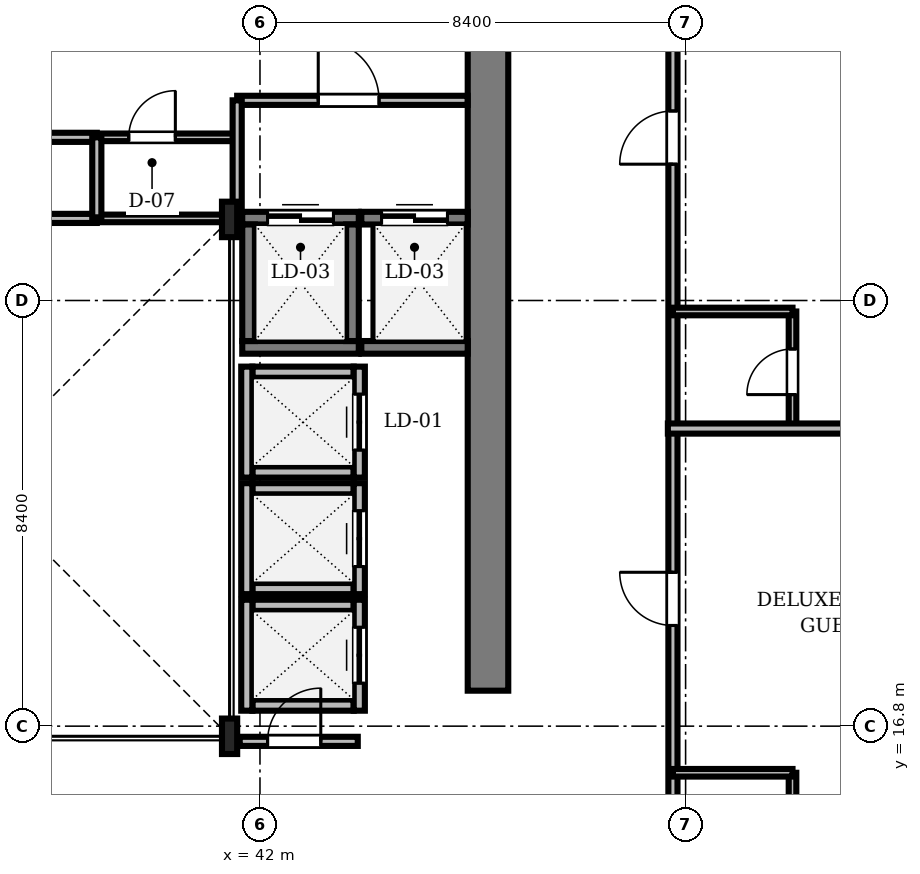
"""IFC4 building model, lengths in metres.
Left out: names, types, materials, properties, quantities, classifications, styles, units other than length and angle.
Written with IfcOpenShell. Run it as: python <this file> out.ifc"""

import sys

from ifc_helpers import new_model, si_unit, direction, frame, frame_2d, origin, origin_2d, place, context, subcontext, project, spatial, rectangle, i_section, extrude, source, transform, mapped, element, fill, save


model = new_model("IFC4")
c1 = context("Model", 3, precision=1e-05, world=origin(), true_north=direction((0.0, 1.0)))
c2 = subcontext(c1, "Body", "Model", "MODEL_VIEW")
j1 = project(units=[si_unit("LENGTHUNIT", "METRE"), si_unit("PLANEANGLEUNIT", "RADIAN")], contexts=[c1])
p1 = place(None, origin())
s1 = spatial("IfcSite", under=j1, at=p1, CompositionType="ELEMENT")
p2 = place(p1, origin())
s2 = spatial("IfcBuilding", under=s1, at=p2, CompositionType="ELEMENT")
p3 = place(p2, frame((0.0, 0.0, 233.55)))
s3 = spatial("IfcBuildingStorey", under=s2, at=p3, CompositionType="ELEMENT", Elevation=233.55)
m1 = source(origin(), c2, "Body", "SweptSolid", [
    extrude(rectangle(XDim=13.15, YDim=0.8, at=frame_2d((6.575, 0.0))), origin(), (0.0, 0.0, 1.0), 3.1),
])
p4 = place(p3, frame((46.5, 17.5, 0.0), z_axis=(0.0, 0.0, 1.0), x_axis=(0.0, 1.0, 0.0)))
e1 = element("IfcWall", 1, at=p4, inside=s3, PredefinedType="SHEAR", context=c2, shape_type="MappedRepresentation", body=[
    mapped(m1, transform((0.0, 0.0, 0.0), scale=1.0)),
])
m2 = source(origin(), c2, "Body", "SweptSolid", [
    extrude(i_section(OverallWidth=0.3, OverallDepth=0.7, WebThickness=0.017, FlangeThickness=0.032, FilletRadius=0.027, at=origin_2d()), origin(), (0.0, 0.0, 1.0), 3.1),
])
for number, where, z_axis, x_axis in (
    (2, (41.4, 16.6, 0.0), (0.0, 0.0, 1.0), (1.0, 0.0, 0.0)),
    (3, (41.4, 26.8, 0.0), (0.0, 0.0, 1.0), (1.0, 0.0, 0.0)),
):
    element("IfcColumn", number, at=place(p3, frame(where, z_axis=z_axis, x_axis=x_axis)), inside=s3, PredefinedType="COLUMN", context=c2, shape_type="MappedRepresentation", body=[
        mapped(m2, transform((0.0, 0.0, 0.0), scale=1.0)),
    ])
m3 = source(origin(), c2, "Body", "SweptSolid", [
    extrude(rectangle(XDim=2.0, YDim=0.22, at=frame_2d((1.0, 0.0))), origin(), (0.0, 0.0, 1.0), 3.1),
])
for number, where, z_axis, x_axis in (
    (4, (41.85, 21.815, 0.0), (0.0, 0.0, 1.0), (1.0, 0.0, 0.0)),
    (5, (41.85, 23.785, 0.0), (0.0, 0.0, 1.0), (1.0, 0.0, 0.0)),
):
    element("IfcWall", number, at=place(p3, frame(where, z_axis=z_axis, x_axis=x_axis)), inside=s3, PredefinedType="SOLIDWALL", context=c2, shape_type="MappedRepresentation", body=[
        mapped(m3, transform((0.0, 0.0, 0.0), scale=1.0)),
    ])
m4 = source(origin(), c2, "Body", "SweptSolid", [
    extrude(rectangle(XDim=2.19, YDim=0.22, at=frame_2d((1.095, 0.0))), origin(), (0.0, 0.0, 1.0), 3.1),
])
p5 = place(p3, frame((41.74, 21.705, 0.0), z_axis=(0.0, 0.0, 1.0), x_axis=(0.0, 1.0, 0.0)))
e6 = element("IfcWall", 6, at=p5, inside=s3, PredefinedType="SOLIDWALL", context=c2, shape_type="MappedRepresentation", body=[
    mapped(m4, transform((0.0, 0.0, 0.0), scale=1.0)),
])
p6 = place(p3, frame((43.96, 21.705, 0.0), z_axis=(0.0, 0.0, 1.0), x_axis=(0.0, 1.0, 0.0)))
e7 = element("IfcWall", 7, at=p6, inside=s3, PredefinedType="SOLIDWALL", context=c2, shape_type="MappedRepresentation", body=[
    mapped(m4, transform((0.0, 0.0, 0.0), scale=1.0)),
])
m5 = source(origin(), c2, "Body", "SweptSolid", [
    extrude(rectangle(XDim=1.1, YDim=2.2, at=frame_2d((0.55, 1.1))), frame((0.0, 0.12, 0.0), z_axis=(0.0, -1.0, 0.0), x_axis=(1.0, 0.0, 0.0)), (0.0, 0.0, 1.0), 0.24),
])
p7 = place(p6, frame((0.545, 0.0, 0.0)))
e8 = element("IfcOpeningElement", 8, at=p7, cuts=e7, PredefinedType="OPENING", context=c2, shape_type="MappedRepresentation", body=[
    mapped(m5, transform((0.0, 0.0, 0.0), scale=1.0)),
])
for number, where, z_axis, x_axis in (
    (9, (41.85, 19.515, 0.0), (0.0, 0.0, 1.0), (1.0, 0.0, 0.0)),
    (10, (41.85, 21.485, 0.0), (0.0, 0.0, 1.0), (1.0, 0.0, 0.0)),
):
    element("IfcWall", number, at=place(p3, frame(where, z_axis=z_axis, x_axis=x_axis)), inside=s3, PredefinedType="SOLIDWALL", context=c2, shape_type="MappedRepresentation", body=[
        mapped(m3, transform((0.0, 0.0, 0.0), scale=1.0)),
    ])
p8 = place(p3, frame((41.74, 19.405, 0.0), z_axis=(0.0, 0.0, 1.0), x_axis=(0.0, 1.0, 0.0)))
e11 = element("IfcWall", 11, at=p8, inside=s3, PredefinedType="SOLIDWALL", context=c2, shape_type="MappedRepresentation", body=[
    mapped(m4, transform((0.0, 0.0, 0.0), scale=1.0)),
])
p9 = place(p3, frame((43.96, 19.405, 0.0), z_axis=(0.0, 0.0, 1.0), x_axis=(0.0, 1.0, 0.0)))
e12 = element("IfcWall", 12, at=p9, inside=s3, PredefinedType="SOLIDWALL", context=c2, shape_type="MappedRepresentation", body=[
    mapped(m4, transform((0.0, 0.0, 0.0), scale=1.0)),
])
p10 = place(p9, frame((0.545, 0.0, 0.0)))
e13 = element("IfcOpeningElement", 13, at=p10, cuts=e12, PredefinedType="OPENING", context=c2, shape_type="MappedRepresentation", body=[
    mapped(m5, transform((0.0, 0.0, 0.0), scale=1.0)),
])
for number, where, z_axis, x_axis in (
    (14, (41.85, 17.215, 0.0), (0.0, 0.0, 1.0), (1.0, 0.0, 0.0)),
    (15, (41.85, 19.185, 0.0), (0.0, 0.0, 1.0), (1.0, 0.0, 0.0)),
):
    element("IfcWall", number, at=place(p3, frame(where, z_axis=z_axis, x_axis=x_axis)), inside=s3, PredefinedType="SOLIDWALL", context=c2, shape_type="MappedRepresentation", body=[
        mapped(m3, transform((0.0, 0.0, 0.0), scale=1.0)),
    ])
p11 = place(p3, frame((41.74, 17.105, 0.0), z_axis=(0.0, 0.0, 1.0), x_axis=(0.0, 1.0, 0.0)))
e16 = element("IfcWall", 16, at=p11, inside=s3, PredefinedType="SOLIDWALL", context=c2, shape_type="MappedRepresentation", body=[
    mapped(m4, transform((0.0, 0.0, 0.0), scale=1.0)),
])
p12 = place(p3, frame((43.96, 17.105, 0.0), z_axis=(0.0, 0.0, 1.0), x_axis=(0.0, 1.0, 0.0)))
e17 = element("IfcWall", 17, at=p12, inside=s3, PredefinedType="SOLIDWALL", context=c2, shape_type="MappedRepresentation", body=[
    mapped(m4, transform((0.0, 0.0, 0.0), scale=1.0)),
])
p13 = place(p12, frame((0.545, 0.0, 0.0)))
e18 = element("IfcOpeningElement", 18, at=p13, cuts=e17, PredefinedType="OPENING", context=c2, shape_type="MappedRepresentation", body=[
    mapped(m5, transform((0.0, 0.0, 0.0), scale=1.0)),
])
m6 = source(origin(), c2, "Body", "SweptSolid", [
    extrude(rectangle(XDim=2.3, YDim=0.25, at=frame_2d((1.15, 0.0))), origin(), (0.0, 0.0, 1.0), 3.1),
])
p14 = place(p3, frame((41.65, 24.275, 0.0), z_axis=(0.0, 0.0, 1.0), x_axis=(1.0, 0.0, 0.0)))
e19 = element("IfcWall", 19, at=p14, inside=s3, PredefinedType="SOLIDWALL", context=c2, shape_type="MappedRepresentation", body=[
    mapped(m6, transform((0.0, 0.0, 0.0), scale=1.0)),
])
p15 = place(p3, frame((41.65, 26.825, 0.0), z_axis=(0.0, 0.0, 1.0), x_axis=(1.0, 0.0, 0.0)))
e20 = element("IfcWall", 20, at=p15, inside=s3, PredefinedType="SOLIDWALL", context=c2, shape_type="MappedRepresentation", body=[
    mapped(m6, transform((0.0, 0.0, 0.0), scale=1.0)),
])
m7 = source(origin(), c2, "Body", "SweptSolid", [
    extrude(rectangle(XDim=1.3, YDim=2.3, at=frame_2d((0.65, 1.15))), frame((0.0, 0.135, 0.0), z_axis=(0.0, -1.0, 0.0), x_axis=(1.0, 0.0, 0.0)), (0.0, 0.0, 1.0), 0.27),
])
p16 = place(p15, frame((0.5, 0.0, 0.0)))
e21 = element("IfcOpeningElement", 21, at=p16, cuts=e20, PredefinedType="OPENING", context=c2, shape_type="MappedRepresentation", body=[
    mapped(m7, transform((0.0, 0.0, 0.0), scale=1.0)),
])
for number, where, z_axis, x_axis in (
    (22, (41.775, 24.4, 0.0), (0.0, 0.0, 1.0), (0.0, 1.0, 0.0)),
    (23, (43.825, 24.4, 0.0), (0.0, 0.0, 1.0), (0.0, 1.0, 0.0)),
):
    element("IfcWall", number, at=place(p3, frame(where, z_axis=z_axis, x_axis=x_axis)), inside=s3, PredefinedType="SOLIDWALL", context=c2, shape_type="MappedRepresentation", body=[
        mapped(m6, transform((0.0, 0.0, 0.0), scale=1.0)),
    ])
m8 = source(origin(), c2, "Body", "SweptSolid", [
    extrude(rectangle(XDim=2.1, YDim=0.25, at=frame_2d((1.05, 0.0))), origin(), (0.0, 0.0, 1.0), 3.1),
])
p17 = place(p3, frame((44.0, 24.275, 0.0), z_axis=(0.0, 0.0, 1.0), x_axis=(1.0, 0.0, 0.0)))
e24 = element("IfcWall", 24, at=p17, inside=s3, PredefinedType="SOLIDWALL", context=c2, shape_type="MappedRepresentation", body=[
    mapped(m8, transform((0.0, 0.0, 0.0), scale=1.0)),
])
p18 = place(p3, frame((44.0, 26.825, 0.0), z_axis=(0.0, 0.0, 1.0), x_axis=(1.0, 0.0, 0.0)))
e25 = element("IfcWall", 25, at=p18, inside=s3, PredefinedType="SOLIDWALL", context=c2, shape_type="MappedRepresentation", body=[
    mapped(m8, transform((0.0, 0.0, 0.0), scale=1.0)),
])
p19 = place(p18, frame((0.4, 0.0, 0.0)))
e26 = element("IfcOpeningElement", 26, at=p19, cuts=e25, PredefinedType="OPENING", context=c2, shape_type="MappedRepresentation", body=[
    mapped(m7, transform((0.0, 0.0, 0.0), scale=1.0)),
])
m9 = source(origin(), c2, "Body", "SweptSolid", [
    extrude(rectangle(XDim=27.53, YDim=0.18, at=frame_2d((13.765, 0.0))), origin(), (0.0, 0.0, 1.0), 2.542),
])
p20 = place(p3, frame((50.15, 13.57, 0.0), z_axis=(0.0, 0.0, 1.0), x_axis=(0.0, 1.0, 0.0)))
e27 = element("IfcWall", 27, at=p20, inside=s3, PredefinedType="PARTITIONING", context=c2, shape_type="MappedRepresentation", body=[
    mapped(m9, transform((0.0, 0.0, 0.0), scale=1.0)),
])
m10 = source(origin(), c2, "Body", "SweptSolid", [
    extrude(rectangle(XDim=1.05, YDim=2.2, at=frame_2d((0.525, 1.1))), frame((0.0, 0.1, 0.0), z_axis=(0.0, -1.0, 0.0), x_axis=(1.0, 0.0, 0.0)), (0.0, 0.0, 1.0), 0.2),
])
p21 = place(p20, frame((5.217, 0.0, 0.0)))
e28 = element("IfcOpeningElement", 28, at=p21, cuts=e27, PredefinedType="OPENING", context=c2, shape_type="MappedRepresentation", body=[
    mapped(m10, transform((0.0, 0.0, 0.0), scale=1.0)),
])
p22 = place(p20, frame((14.32, 0.0, 0.0)))
e29 = element("IfcOpeningElement", 29, at=p22, cuts=e27, PredefinedType="OPENING", context=c2, shape_type="MappedRepresentation", body=[
    mapped(m10, transform((0.0, 0.0, 0.0), scale=1.0)),
])
p23 = place(p20, frame((23.423, 0.0, 0.0)))
e30 = element("IfcOpeningElement", 30, at=p23, cuts=e27, PredefinedType="OPENING", context=c2, shape_type="MappedRepresentation", body=[
    mapped(m10, transform((0.0, 0.0, 0.0), scale=1.0)),
])
m11 = source(origin(), c2, "Body", "SweptSolid", [
    extrude(rectangle(XDim=7.33, YDim=0.18, at=frame_2d((3.665, 0.0))), origin(), (0.0, 0.0, 1.0), 2.732),
])
p24 = place(p3, frame((31.45, 28.42, 0.0), z_axis=(0.0, 0.0, 1.0), x_axis=(1.0, 0.0, 0.0)))
e31 = element("IfcWall", 31, at=p24, inside=s3, PredefinedType="PARTITIONING", context=c2, shape_type="MappedRepresentation", body=[
    mapped(m11, transform((0.0, 0.0, 0.0), scale=1.0)),
])
m12 = source(origin(), c2, "Body", "SweptSolid", [
    extrude(rectangle(XDim=0.95, YDim=2.15, at=frame_2d((0.475, 1.075))), frame((0.0, 0.1, 0.0), z_axis=(0.0, -1.0, 0.0), x_axis=(1.0, 0.0, 0.0)), (0.0, 0.0, 1.0), 0.2),
])
p25 = place(p24, frame((0.65, 0.0, 0.0)))
e32 = element("IfcOpeningElement", 32, at=p25, cuts=e31, PredefinedType="OPENING", context=c2, shape_type="MappedRepresentation", body=[
    mapped(m12, transform((0.0, 0.0, 0.0), scale=1.0)),
])
m13 = source(origin(), c2, "Body", "SweptSolid", [
    extrude(rectangle(XDim=4.548, YDim=0.18, at=frame_2d((2.274, 0.0))), origin(), (0.0, 0.0, 1.0), 2.732),
])
p26 = place(p3, frame((41.55, 29.15, 0.0), z_axis=(0.0, 0.0, 1.0), x_axis=(1.0, 0.0, 0.0)))
e33 = element("IfcWall", 33, at=p26, inside=s3, PredefinedType="PARTITIONING", context=c2, shape_type="MappedRepresentation", body=[
    mapped(m13, transform((0.0, 0.0, 0.0), scale=1.0)),
])
m14 = source(origin(), c2, "Body", "SweptSolid", [
    extrude(rectangle(XDim=1.2, YDim=2.2, at=frame_2d((0.6, 1.1))), frame((0.0, 0.1, 0.0), z_axis=(0.0, -1.0, 0.0), x_axis=(1.0, 0.0, 0.0)), (0.0, 0.0, 1.0), 0.2),
])
p27 = place(p26, frame((1.6, 0.0, 0.0)))
e34 = element("IfcOpeningElement", 34, at=p27, cuts=e33, PredefinedType="OPENING", context=c2, shape_type="MappedRepresentation", body=[
    mapped(m14, transform((0.0, 0.0, 0.0), scale=1.0)),
])
m15 = source(origin(), c2, "Body", "SweptSolid", [
    extrude(rectangle(XDim=2.74, YDim=0.15, at=frame_2d((1.37, 0.0))), origin(), (0.0, 0.0, 1.0), 3.1),
])
p28 = place(p3, frame((38.78, 28.42, 0.0), z_axis=(0.0, 0.0, 1.0), x_axis=(1.0, 0.0, 0.0)))
e35 = element("IfcWall", 35, at=p28, inside=s3, PredefinedType="PARTITIONING", context=c2, shape_type="MappedRepresentation", body=[
    mapped(m15, transform((0.0, 0.0, 0.0), scale=1.0)),
])
m16 = source(origin(), c2, "Body", "SweptSolid", [
    extrude(rectangle(XDim=0.92, YDim=2.1, at=frame_2d((0.46, 1.05))), frame((0.0, 0.085, 0.0), z_axis=(0.0, -1.0, 0.0), x_axis=(1.0, 0.0, 0.0)), (0.0, 0.0, 1.0), 0.17),
])
p29 = place(p28, frame((0.63, 0.0, 0.0)))
e36 = element("IfcOpeningElement", 36, at=p29, cuts=e35, PredefinedType="OPENING", context=c2, shape_type="MappedRepresentation", body=[
    mapped(m16, transform((0.0, 0.0, 0.0), scale=1.0)),
])
m17 = source(origin(), c2, "Body", "SweptSolid", [
    extrude(rectangle(XDim=2.33, YDim=0.18, at=frame_2d((1.165, 0.0))), origin(), (0.0, 0.0, 1.0), 2.542),
])
p30 = place(p3, frame((41.6, 16.5, 0.0), z_axis=(0.0, 0.0, 1.0), x_axis=(1.0, 0.0, 0.0)))
e37 = element("IfcWall", 37, at=p30, inside=s3, PredefinedType="PARTITIONING", context=c2, shape_type="MappedRepresentation", body=[
    mapped(m17, transform((0.0, 0.0, 0.0), scale=1.0)),
])
p31 = place(p30, frame((0.55, 0.0, 0.0)))
e38 = element("IfcOpeningElement", 38, at=p31, cuts=e37, PredefinedType="OPENING", context=c2, shape_type="MappedRepresentation", body=[
    mapped(m10, transform((0.0, 0.0, 0.0), scale=1.0)),
])
m18 = source(origin(), c2, "Body", "SweptSolid", [
    extrude(rectangle(XDim=2.29, YDim=0.15, at=frame_2d((1.145, 0.0))), origin(), (0.0, 0.0, 1.0), 2.542),
])
p32 = place(p3, frame((52.51, 13.59, 0.0), z_axis=(0.0, 0.0, 1.0), x_axis=(0.0, 1.0, 0.0)))
e39 = element("IfcWall", 39, at=p32, inside=s3, PredefinedType="PARTITIONING", context=c2, shape_type="MappedRepresentation", body=[
    mapped(m18, transform((0.0, 0.0, 0.0), scale=1.0)),
])
m19 = source(origin(), c2, "Body", "SweptSolid", [
    extrude(rectangle(XDim=0.9, YDim=2.1, at=frame_2d((0.45, 1.05))), frame((0.0, 0.085, 0.0), z_axis=(0.0, -1.0, 0.0), x_axis=(1.0, 0.0, 0.0)), (0.0, 0.0, 1.0), 0.17),
])
p33 = place(p32, frame((0.65, 0.0, 0.0)))
e40 = element("IfcOpeningElement", 40, at=p33, cuts=e39, PredefinedType="OPENING", context=c2, shape_type="MappedRepresentation", body=[
    mapped(m19, transform((0.0, 0.0, 0.0), scale=1.0)),
])
m20 = source(origin(), c2, "Body", "SweptSolid", [
    extrude(rectangle(XDim=2.29, YDim=0.15, at=frame_2d((1.145, 0.0))), origin(), (0.0, 0.0, 1.0), 2.792),
])
p34 = place(p3, frame((52.51, 22.693, 0.0), z_axis=(0.0, 0.0, 1.0), x_axis=(0.0, 1.0, 0.0)))
e41 = element("IfcWall", 41, at=p34, inside=s3, PredefinedType="PARTITIONING", context=c2, shape_type="MappedRepresentation", body=[
    mapped(m20, transform((0.0, 0.0, 0.0), scale=1.0)),
])
p35 = place(p34, frame((0.65, 0.0, 0.0)))
e42 = element("IfcOpeningElement", 42, at=p35, cuts=e41, PredefinedType="OPENING", context=c2, shape_type="MappedRepresentation", body=[
    mapped(m19, transform((0.0, 0.0, 0.0), scale=1.0)),
])
m21 = source(origin(), c2, "Body", "SweptSolid", [
    extrude(rectangle(XDim=7.72, YDim=0.2, at=frame_2d((3.86, 0.0))), origin(), (0.0, 0.0, 1.0), 2.376),
])
p36 = place(p3, frame((50.05, 22.673, 0.0), z_axis=(0.0, 0.0, 1.0), x_axis=(1.0, 0.0, 0.0)))
e43 = element("IfcWall", 43, at=p36, inside=s3, PredefinedType="PARTITIONING", context=c2, shape_type="MappedRepresentation", body=[
    mapped(m21, transform((0.0, 0.0, 0.0), scale=1.0)),
])
m22 = source(origin(), c2, "Body", "SweptSolid", [
    extrude(rectangle(XDim=7.33, YDim=0.18, at=frame_2d((3.665, 0.0))), origin(), (0.0, 0.0, 1.0), 2.642),
])
p37 = place(p3, frame((31.45, 26.82, 0.0), z_axis=(0.0, 0.0, 1.0), x_axis=(1.0, 0.0, 0.0)))
e44 = element("IfcWall", 44, at=p37, inside=s3, PredefinedType="PARTITIONING", context=c2, shape_type="MappedRepresentation", body=[
    mapped(m22, transform((0.0, 0.0, 0.0), scale=1.0)),
])
m23 = source(origin(), c2, "Body", "SweptSolid", [
    extrude(rectangle(XDim=2.74, YDim=0.15, at=frame_2d((1.37, 0.0))), origin(), (0.0, 0.0, 1.0), 2.542),
])
p38 = place(p3, frame((38.78, 26.82, 0.0), z_axis=(0.0, 0.0, 1.0), x_axis=(1.0, 0.0, 0.0)))
e45 = element("IfcWall", 45, at=p38, inside=s3, PredefinedType="PARTITIONING", context=c2, shape_type="MappedRepresentation", body=[
    mapped(m23, transform((0.0, 0.0, 0.0), scale=1.0)),
])
m24 = source(origin(), c2, "Body", "SweptSolid", [
    extrude(rectangle(XDim=2.36, YDim=0.15, at=frame_2d((1.18, 0.0))), origin(), (0.0, 0.0, 1.0), 3.1),
])
for number, where, z_axis, x_axis in (
    (46, (50.15, 15.88, 0.0), (0.0, 0.0, 1.0), (1.0, 0.0, 0.0)),
    (47, (50.15, 24.983, 0.0), (0.0, 0.0, 1.0), (1.0, 0.0, 0.0)),
):
    element("IfcWall", number, at=place(p3, frame(where, z_axis=z_axis, x_axis=x_axis)), inside=s3, PredefinedType="PARTITIONING", context=c2, shape_type="MappedRepresentation", body=[
        mapped(m24, transform((0.0, 0.0, 0.0), scale=1.0)),
    ])
m25 = source(origin(), c2, "Body", "SweptSolid", [
    extrude(rectangle(XDim=2.35, YDim=0.18, at=frame_2d((1.175, 0.0))), origin(), (0.0, 0.0, 1.0), 2.542),
])
p39 = place(p3, frame((41.55, 26.8, 0.0), z_axis=(0.0, 0.0, 1.0), x_axis=(0.0, 1.0, 0.0)))
e48 = element("IfcWall", 48, at=p39, inside=s3, PredefinedType="PARTITIONING", context=c2, shape_type="MappedRepresentation", body=[
    mapped(m25, transform((0.0, 0.0, 0.0), scale=1.0)),
])
m26 = source(origin(), c2, "Body", "SweptSolid", [
    extrude(rectangle(XDim=1.6, YDim=0.18, at=frame_2d((0.8, 0.0))), origin(), (0.0, 0.0, 1.0), 2.642),
])
p40 = place(p3, frame((38.78, 26.82, 0.0), z_axis=(0.0, 0.0, 1.0), x_axis=(0.0, 1.0, 0.0)))
e49 = element("IfcWall", 49, at=p40, inside=s3, PredefinedType="PARTITIONING", context=c2, shape_type="MappedRepresentation", body=[
    mapped(m26, transform((0.0, 0.0, 0.0), scale=1.0)),
])
m27 = source(origin(), c2, "Body", "SweptSolid", [
    extrude(rectangle(XDim=1.1, YDim=2.2, at=frame_2d((0.55, 1.1))), frame((0.0, 0.025, 0.0), z_axis=(0.0, -1.0, 0.0), x_axis=(1.0, 0.0, 0.0)), (0.0, 0.0, 1.0), 0.05),
])
p41 = place(p7, origin())
e50 = element("IfcDoor", 50, at=p41, inside=s3, OperationType="DOUBLE_DOOR_SLIDING", PredefinedType="DOOR", context=c2, shape_type="MappedRepresentation", body=[
    mapped(m27, transform((0.0, 0.0, 0.0), scale=1.0)),
])
fill(e8, e50)
p42 = place(p10, origin())
e51 = element("IfcDoor", 51, at=p42, inside=s3, OperationType="DOUBLE_DOOR_SLIDING", PredefinedType="DOOR", context=c2, shape_type="MappedRepresentation", body=[
    mapped(m27, transform((0.0, 0.0, 0.0), scale=1.0)),
])
fill(e13, e51)
p43 = place(p13, origin())
e52 = element("IfcDoor", 52, at=p43, inside=s3, OperationType="DOUBLE_DOOR_SLIDING", PredefinedType="DOOR", context=c2, shape_type="MappedRepresentation", body=[
    mapped(m27, transform((0.0, 0.0, 0.0), scale=1.0)),
])
fill(e18, e52)
m28 = source(origin(), c2, "Body", "SweptSolid", [
    extrude(rectangle(XDim=1.3, YDim=2.3, at=frame_2d((0.65, 1.15))), frame((0.0, 0.025, 0.0), z_axis=(0.0, -1.0, 0.0), x_axis=(1.0, 0.0, 0.0)), (0.0, 0.0, 1.0), 0.05),
])
p44 = place(p16, origin())
e53 = element("IfcDoor", 53, at=p44, inside=s3, OperationType="DOUBLE_DOOR_SLIDING", PredefinedType="DOOR", context=c2, shape_type="MappedRepresentation", body=[
    mapped(m28, transform((0.0, 0.0, 0.0), scale=1.0)),
])
fill(e21, e53)
p45 = place(p19, origin())
e54 = element("IfcDoor", 54, at=p45, inside=s3, OperationType="DOUBLE_DOOR_SLIDING", PredefinedType="DOOR", context=c2, shape_type="MappedRepresentation", body=[
    mapped(m28, transform((0.0, 0.0, 0.0), scale=1.0)),
])
fill(e26, e54)
m29 = source(origin(), c2, "Body", "SweptSolid", [
    extrude(rectangle(XDim=1.05, YDim=2.2, at=frame_2d((0.525, 1.1))), frame((0.0, 0.025, 0.0), z_axis=(0.0, -1.0, 0.0), x_axis=(1.0, 0.0, 0.0)), (0.0, 0.0, 1.0), 0.05),
])
p46 = place(p21, origin())
e55 = element("IfcDoor", 55, at=p46, inside=s3, OperationType="SINGLE_SWING_RIGHT", PredefinedType="DOOR", context=c2, shape_type="MappedRepresentation", body=[
    mapped(m29, transform((0.0, 0.0, 0.0), scale=1.0)),
])
fill(e28, e55)
p47 = place(p22, origin())
e56 = element("IfcDoor", 56, at=p47, inside=s3, OperationType="SINGLE_SWING_LEFT", PredefinedType="DOOR", context=c2, shape_type="MappedRepresentation", body=[
    mapped(m29, transform((0.0, 0.0, 0.0), scale=1.0)),
])
fill(e29, e56)
m30 = source(origin(), c2, "Body", "SweptSolid", [
    extrude(rectangle(XDim=1.2, YDim=2.2, at=frame_2d((0.6, 1.1))), frame((0.0, 0.025, 0.0), z_axis=(0.0, -1.0, 0.0), x_axis=(1.0, 0.0, 0.0)), (0.0, 0.0, 1.0), 0.05),
])
p48 = place(p27, origin())
e57 = element("IfcDoor", 57, at=p48, inside=s3, OperationType="SINGLE_SWING_LEFT", PredefinedType="DOOR", context=c2, shape_type="MappedRepresentation", body=[
    mapped(m30, transform((0.0, 0.0, 0.0), scale=1.0)),
])
fill(e34, e57)
m31 = source(origin(), c2, "Body", "SweptSolid", [
    extrude(rectangle(XDim=0.92, YDim=2.1, at=frame_2d((0.46, 1.05))), frame((0.0, 0.025, 0.0), z_axis=(0.0, -1.0, 0.0), x_axis=(1.0, 0.0, 0.0)), (0.0, 0.0, 1.0), 0.05),
])
p49 = place(p29, origin())
e58 = element("IfcDoor", 58, at=p49, inside=s3, OperationType="SINGLE_SWING_RIGHT", PredefinedType="DOOR", context=c2, shape_type="MappedRepresentation", body=[
    mapped(m31, transform((0.0, 0.0, 0.0), scale=1.0)),
])
fill(e36, e58)
p50 = place(p31, origin())
e59 = element("IfcDoor", 59, at=p50, inside=s3, OperationType="SINGLE_SWING_RIGHT", PredefinedType="DOOR", context=c2, shape_type="MappedRepresentation", body=[
    mapped(m29, transform((0.0, 0.0, 0.0), scale=1.0)),
])
fill(e38, e59)
m32 = source(origin(), c2, "Body", "SweptSolid", [
    extrude(rectangle(XDim=0.9, YDim=2.1, at=frame_2d((0.45, 1.05))), frame((0.0, 0.025, 0.0), z_axis=(0.0, -1.0, 0.0), x_axis=(1.0, 0.0, 0.0)), (0.0, 0.0, 1.0), 0.05),
])
p51 = place(p35, origin())
e60 = element("IfcDoor", 60, at=p51, inside=s3, OperationType="SINGLE_SWING_LEFT", PredefinedType="DOOR", context=c2, shape_type="MappedRepresentation", body=[
    mapped(m32, transform((0.0, 0.0, 0.0), scale=1.0)),
])
fill(e42, e60)
save(model, sys.argv[1])
